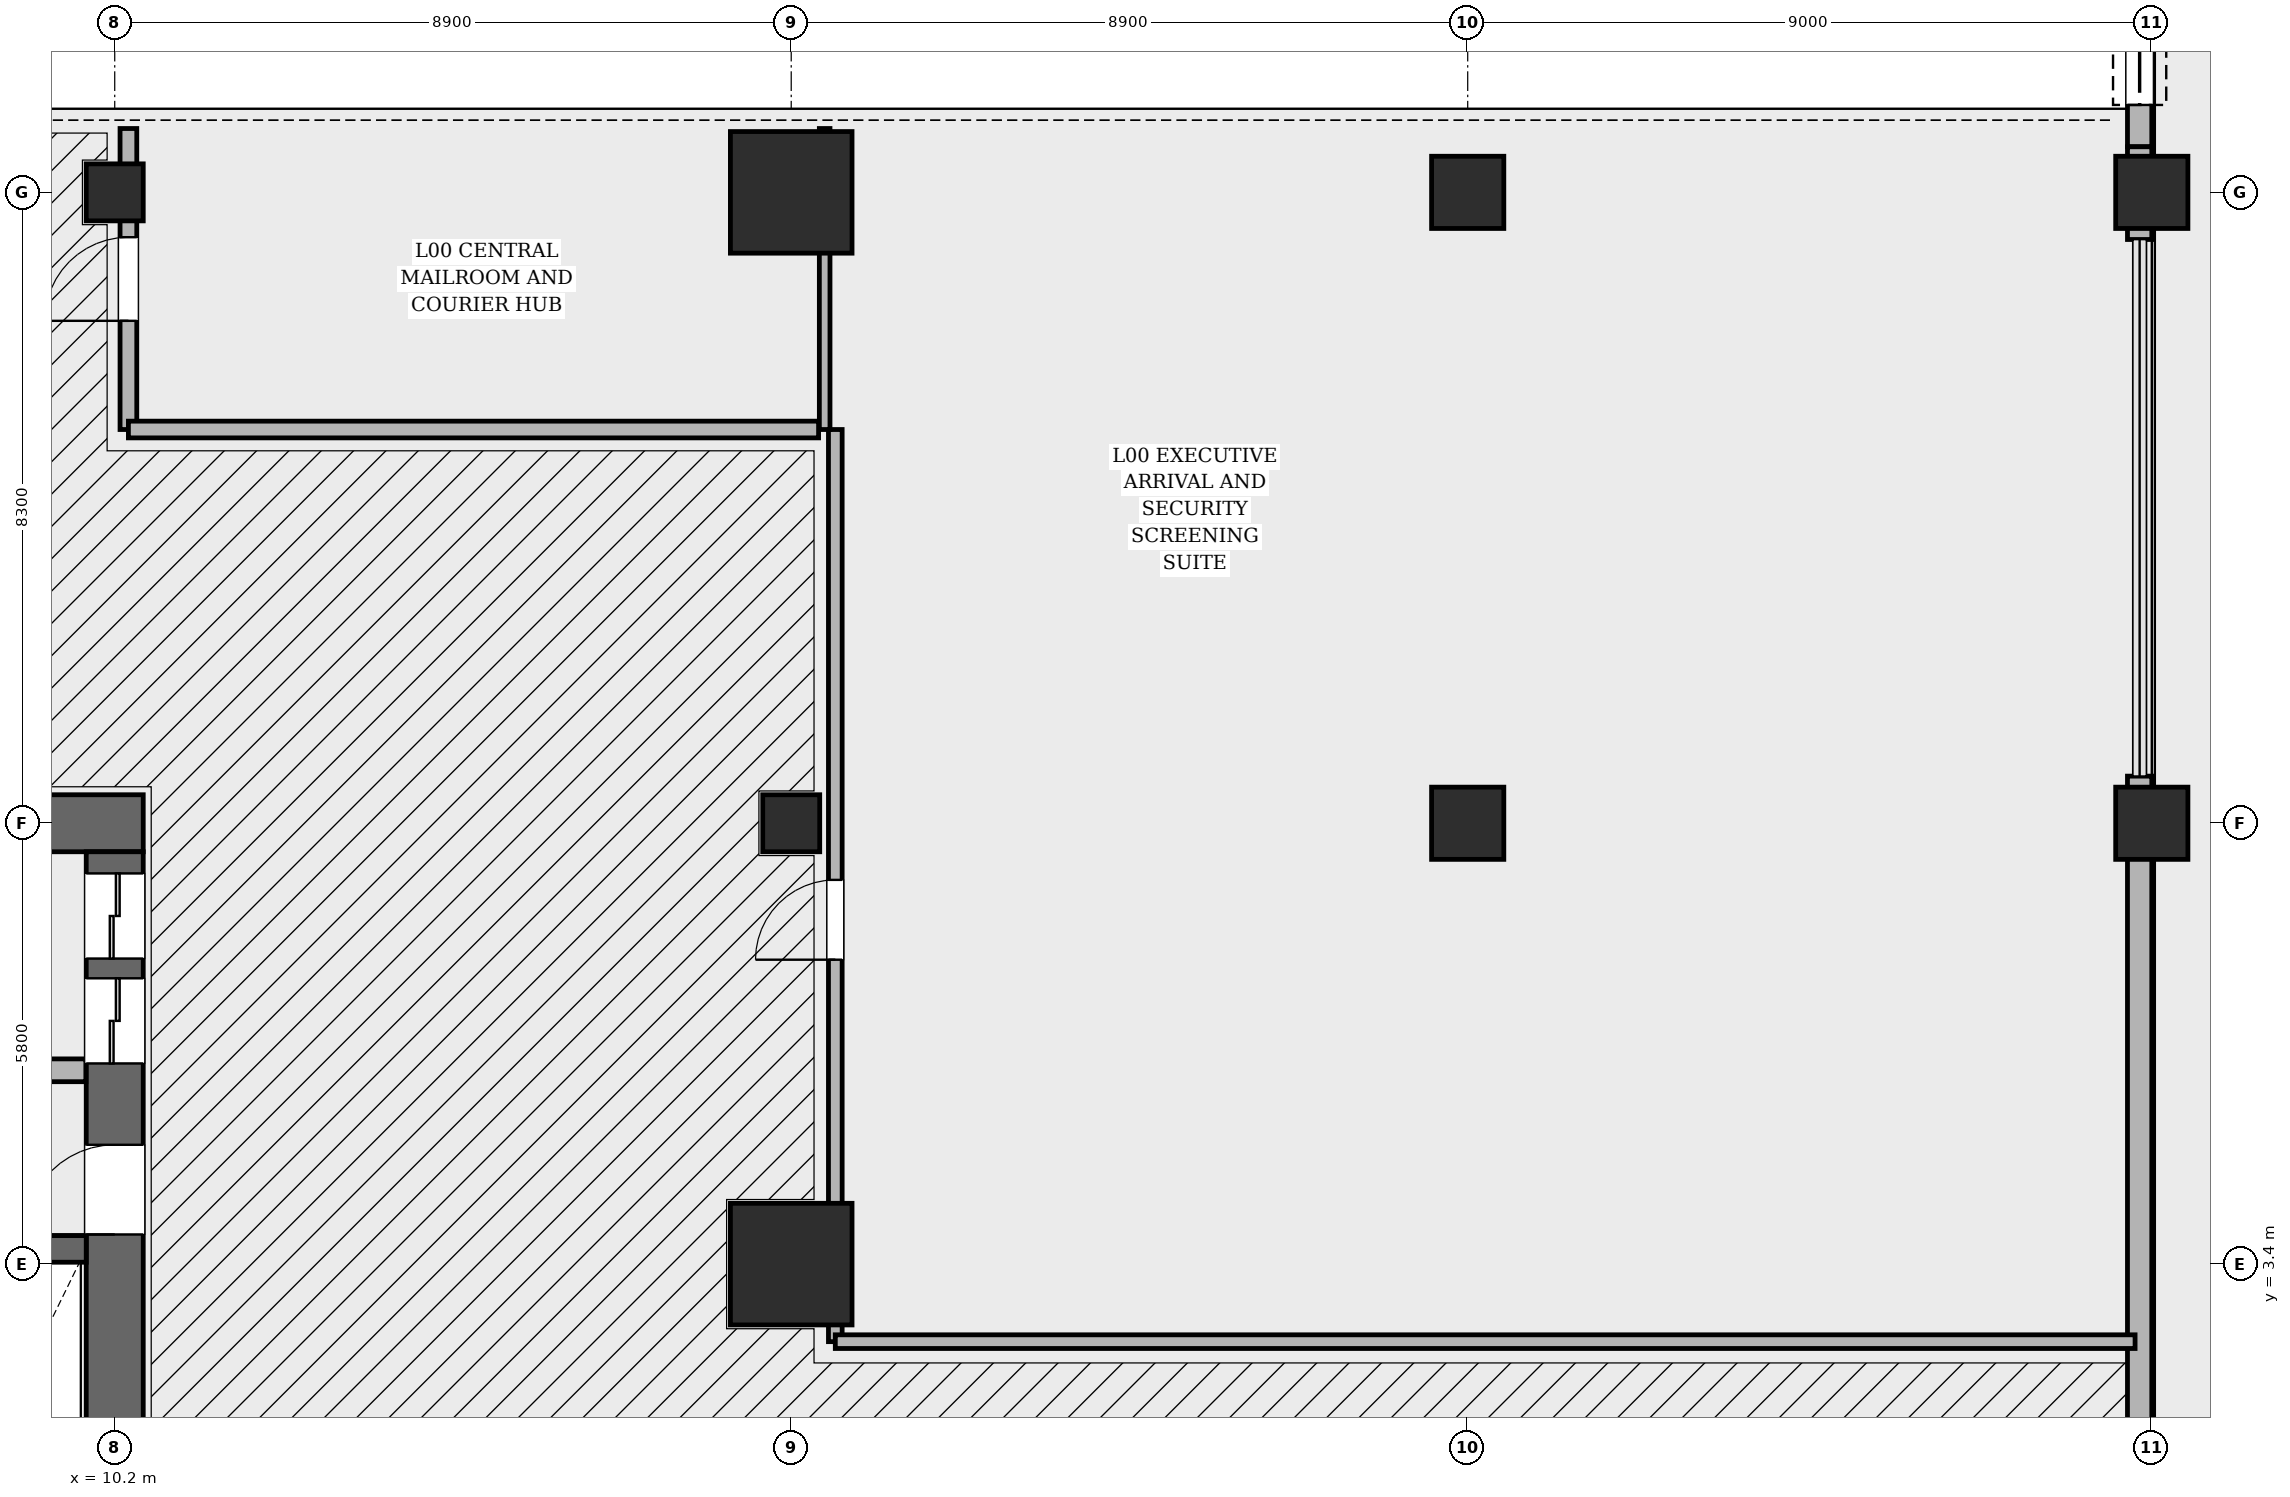
"""IFC4 building model, lengths in metres.
Left out: names, types, materials, properties, quantities, classifications, styles, units other than length and angle.
Written with IfcOpenShell. Run it as: python <this file> out.ifc"""

import sys

from ifc_helpers import new_model, si_unit, direction, frame, frame_2d, origin, origin_2d, place, context, subcontext, project, spatial, rectangle, hollow_rectangle, circle, extrude, element, fill, save


model = new_model("IFC4")
c1 = context("Model", 3, precision=1e-05, world=origin(), true_north=direction((0.0, 1.0)))
c2 = subcontext(c1, "Body", "Model", "MODEL_VIEW")
j1 = project(units=[si_unit("LENGTHUNIT", "METRE"), si_unit("PLANEANGLEUNIT", "RADIAN")], contexts=[c1])
p1 = place(None, origin())
s1 = spatial("IfcSite", under=j1, at=p1, CompositionType="ELEMENT")
p2 = place(p1, origin())
s2 = spatial("IfcBuilding", under=s1, at=p2, CompositionType="ELEMENT")
p3 = place(p2, origin())
s3 = spatial("IfcBuildingStorey", under=s2, at=p3, CompositionType="ELEMENT", Elevation=0.0)
p4 = place(p3, frame((-10.575, 9.2, 0.0), z_axis=(0.0, 0.0, 1.0), x_axis=(1.0, 0.0, 0.0)))
e1 = element("IfcWall", 1, at=p4, inside=s3, PredefinedType="SHEAR", context=c2, shape_type="SweptSolid", body=[
    extrude(rectangle(XDim=21.15, YDim=0.75, at=frame_2d((10.575, 0.0))), origin(), (0.0, 0.0, 1.0), 6.0),
])
p5 = place(p3, frame((10.2, 8.825, 0.0), z_axis=(0.0, 0.0, 1.0), x_axis=(0.0, -1.0, 0.0)))
e2 = element("IfcWall", 2, at=p5, inside=s3, PredefinedType="SHEAR", context=c2, shape_type="SweptSolid", body=[
    extrude(rectangle(XDim=17.65, YDim=0.75, at=frame_2d((8.825, 0.0))), origin(), (0.0, 0.0, 1.0), 6.0),
])
p6 = place(p5, frame((3.855, 0.0, 0.0)))
e3 = element("IfcOpeningElement", 3, at=p6, cuts=e2, PredefinedType="OPENING", context=c2, shape_type="SweptSolid", body=[
    extrude(rectangle(XDim=1.18, YDim=2.2, at=frame_2d((0.59, 1.1))), frame((0.0, 0.385, 0.0), z_axis=(0.0, -1.0, 0.0), x_axis=(1.0, 0.0, 0.0)), (0.0, 0.0, 1.0), 0.77),
])
p7 = place(p5, frame((1.665, 0.0, 0.0)))
e4 = element("IfcOpeningElement", 4, at=p7, cuts=e2, PredefinedType="OPENING", context=c2, shape_type="SweptSolid", body=[
    extrude(rectangle(XDim=1.12, YDim=2.25, at=frame_2d((0.56, 1.125))), frame((0.0, 0.385, 0.0), z_axis=(0.0, -1.0, 0.0), x_axis=(1.0, 0.0, 0.0)), (0.0, 0.0, 1.0), 0.77),
])
p8 = place(p5, frame((0.285, 0.0, 0.0)))
e5 = element("IfcOpeningElement", 5, at=p8, cuts=e2, PredefinedType="OPENING", context=c2, shape_type="SweptSolid", body=[
    extrude(rectangle(XDim=1.12, YDim=2.25, at=frame_2d((0.56, 1.125))), frame((0.0, 0.385, 0.0), z_axis=(0.0, -1.0, 0.0), x_axis=(1.0, 0.0, 0.0)), (0.0, 0.0, 1.0), 0.77),
])
p9 = place(p3, frame((4.65, 3.6, 0.0), z_axis=(0.0, 0.0, 1.0), x_axis=(1.0, 0.0, 0.0)))
e6 = element("IfcWall", 6, at=p9, inside=s3, PredefinedType="SOLIDWALL", context=c2, shape_type="SweptSolid", body=[
    extrude(rectangle(XDim=5.175, YDim=0.35, at=frame_2d((2.587, 0.0))), origin(), (0.0, 0.0, 1.0), 6.0),
])
for number, where, z_axis, x_axis in (
    (7, (19.1, 3.4, 0.0), (0.0, 0.0, 1.0), (1.0, 0.0, 0.0)),
    (8, (19.1, 17.5, 0.0), (0.0, 0.0, 1.0), (1.0, 0.0, 0.0)),
):
    element("IfcColumn", number, at=place(p3, frame(where, z_axis=z_axis, x_axis=x_axis)), inside=s3, PredefinedType="COLUMN", context=c2, shape_type="SweptSolid", body=[
        extrude(hollow_rectangle(XDim=1.6, YDim=1.6, WallThickness=0.05, at=origin_2d()), origin(), (0.0, 0.0, 1.0), 6.0),
    ])
for number, where, z_axis, x_axis in (
    (9, (37.0, 9.2, 0.0), (0.0, 0.0, 1.0), (1.0, 0.0, 0.0)),
    (10, (28.0, 17.5, 0.0), (0.0, 0.0, 1.0), (1.0, 0.0, 0.0)),
    (11, (37.0, 17.5, 0.0), (0.0, 0.0, 1.0), (1.0, 0.0, 0.0)),
    (12, (28.0, 9.2, 0.0), (0.0, 0.0, 1.0), (1.0, 0.0, 0.0)),
):
    element("IfcColumn", number, at=place(p3, frame(where, z_axis=z_axis, x_axis=x_axis)), inside=s3, PredefinedType="COLUMN", context=c2, shape_type="SweptSolid", body=[
        extrude(rectangle(XDim=0.95, YDim=0.95, at=origin_2d()), origin(), (0.0, 0.0, 1.0), 6.0),
    ])
for number, where, z_axis, x_axis in (
    (13, (10.2, 17.5, 0.0), (0.0, 0.0, 1.0), (1.0, 0.0, 0.0)),
    (14, (19.1, 9.2, 0.0), (0.0, 0.0, 1.0), (1.0, 0.0, 0.0)),
):
    element("IfcColumn", number, at=place(p3, frame(where, z_axis=z_axis, x_axis=x_axis)), inside=s3, PredefinedType="PILASTER", context=c2, shape_type="SweptSolid", body=[
        extrude(circle(Radius=0.375, at=origin_2d()), origin(), (0.0, 0.0, 1.0), 6.0),
    ])
p10 = place(p3, frame((36.84, 24.4, 0.0), z_axis=(0.0, 0.0, 1.0), x_axis=(0.0, -1.0, 0.0)))
e15 = element("IfcWall", 15, at=p10, inside=s3, PredefinedType="SOLIDWALL", context=c2, shape_type="SweptSolid", body=[
    extrude(rectangle(XDim=6.3, YDim=0.32, at=frame_2d((3.15, 0.0))), origin(), (0.0, 0.0, 1.0), 5.164),
])
p11 = place(p10, frame((0.55, 0.0, 0.0)))
e16 = element("IfcOpeningElement", 16, at=p11, cuts=e15, PredefinedType="OPENING", context=c2, shape_type="SweptSolid", body=[
    extrude(rectangle(XDim=5.2, YDim=3.2, at=frame_2d((2.6, 1.6))), frame((0.0, 0.17, 0.0), z_axis=(0.0, -1.0, 0.0), x_axis=(1.0, 0.0, 0.0)), (0.0, 0.0, 1.0), 0.34),
])
p12 = place(p3, frame((36.84, 18.1, 0.0), z_axis=(0.0, 0.0, 1.0), x_axis=(0.0, -1.0, 0.0)))
e17 = element("IfcWall", 17, at=p12, inside=s3, PredefinedType="SOLIDWALL", context=c2, shape_type="SweptSolid", body=[
    extrude(rectangle(XDim=1.22, YDim=0.32, at=frame_2d((0.61, 0.0))), origin(), (0.0, 0.0, 1.0), 5.014),
])
p13 = place(p3, frame((36.84, 9.82, 0.0), z_axis=(0.0, 0.0, 1.0), x_axis=(0.0, -1.0, 0.0)))
e18 = element("IfcWall", 18, at=p13, inside=s3, PredefinedType="SOLIDWALL", context=c2, shape_type="SweptSolid", body=[
    extrude(rectangle(XDim=19.64, YDim=0.32, at=frame_2d((9.82, 0.0))), origin(), (0.0, 0.0, 1.0), 5.014),
])
p14 = place(p3, frame((5.06, 5.95, 0.0), z_axis=(0.0, 0.0, 1.0), x_axis=(1.0, 0.0, 0.0)))
e19 = element("IfcWall", 19, at=p14, inside=s3, PredefinedType="SOLIDWALL", context=c2, shape_type="SweptSolid", body=[
    extrude(rectangle(XDim=4.76, YDim=0.3, at=frame_2d((2.38, 0.0))), origin(), (0.0, 0.0, 1.0), 5.72),
])
p15 = place(p3, frame((19.68, 2.38, 0.0), z_axis=(0.0, 0.0, 1.0), x_axis=(0.0, 1.0, 0.0)))
e20 = element("IfcWall", 20, at=p15, inside=s3, PredefinedType="PARTITIONING", context=c2, shape_type="SweptSolid", body=[
    extrude(rectangle(XDim=12.0, YDim=0.18, at=frame_2d((6.0, 0.0))), origin(), (0.0, 0.0, 1.0), 5.014),
])
p16 = place(p15, frame((5.025, 0.0, 0.0)))
e21 = element("IfcOpeningElement", 21, at=p16, cuts=e20, PredefinedType="OPENING", context=c2, shape_type="SweptSolid", body=[
    extrude(rectangle(XDim=1.05, YDim=2.2, at=frame_2d((0.525, 1.1))), frame((0.0, 0.1, 0.0), z_axis=(0.0, -1.0, 0.0), x_axis=(1.0, 0.0, 0.0)), (0.0, 0.0, 1.0), 0.2),
])
p17 = place(p3, frame((19.54, 14.38, 0.0), z_axis=(0.0, 0.0, 1.0), x_axis=(0.0, 1.0, 0.0)))
e22 = element("IfcWall", 22, at=p17, inside=s3, PredefinedType="PARTITIONING", context=c2, shape_type="SweptSolid", body=[
    extrude(rectangle(XDim=3.96, YDim=0.14, at=frame_2d((1.98, 0.0))), origin(), (0.0, 0.0, 1.0), 5.014),
])
p18 = place(p3, frame((36.78, 2.38, 0.0), z_axis=(0.0, 0.0, 1.0), x_axis=(-1.0, 0.0, 0.0)))
e23 = element("IfcWall", 23, at=p18, inside=s3, PredefinedType="PARTITIONING", context=c2, shape_type="SweptSolid", body=[
    extrude(rectangle(XDim=17.1, YDim=0.18, at=frame_2d((8.55, 0.0))), origin(), (0.0, 0.0, 1.0), 5.014),
])
p19 = place(p3, frame((10.38, 14.38, 0.0), z_axis=(0.0, 0.0, 1.0), x_axis=(0.0, 1.0, 0.0)))
e24 = element("IfcWall", 24, at=p19, inside=s3, PredefinedType="SOLIDWALL", context=c2, shape_type="SweptSolid", body=[
    extrude(rectangle(XDim=3.96, YDim=0.22, at=frame_2d((1.98, 0.0))), origin(), (0.0, 0.0, 1.0), 5.014),
])
p20 = place(p19, frame((1.43, 0.0, 0.0)))
e25 = element("IfcOpeningElement", 25, at=p20, cuts=e24, PredefinedType="OPENING", context=c2, shape_type="SweptSolid", body=[
    extrude(rectangle(XDim=1.1, YDim=2.2, at=frame_2d((0.55, 1.1))), frame((0.0, 0.12, 0.0), z_axis=(0.0, -1.0, 0.0), x_axis=(1.0, 0.0, 0.0)), (0.0, 0.0, 1.0), 0.24),
])
p21 = place(p3, frame((19.46, 14.38, 0.0), z_axis=(0.0, 0.0, 1.0), x_axis=(-1.0, 0.0, 0.0)))
e26 = element("IfcWall", 26, at=p21, inside=s3, PredefinedType="SOLIDWALL", context=c2, shape_type="SweptSolid", body=[
    extrude(rectangle(XDim=9.08, YDim=0.22, at=frame_2d((4.54, 0.0))), origin(), (0.0, 0.0, 1.0), 5.014),
])
p22 = place(p11, origin())
e27 = element("IfcDoor", 27, at=p22, inside=s3, OperationType="ROLLINGUP", PredefinedType="GATE", context=c2, shape_type="SweptSolid", body=[
    extrude(rectangle(XDim=5.2, YDim=3.2, at=frame_2d((2.6, 1.6))), frame((0.0, 0.025, 0.0), z_axis=(0.0, -1.0, 0.0), x_axis=(1.0, 0.0, 0.0)), (0.0, 0.0, 1.0), 0.05),
])
fill(e16, e27)
p23 = place(p6, origin())
e28 = element("IfcDoor", 28, at=p23, inside=s3, OperationType="SINGLE_SWING_RIGHT", PredefinedType="DOOR", context=c2, shape_type="SweptSolid", body=[
    extrude(rectangle(XDim=1.18, YDim=2.2, at=frame_2d((0.59, 1.1))), frame((0.0, 0.025, 0.0), z_axis=(0.0, -1.0, 0.0), x_axis=(1.0, 0.0, 0.0)), (0.0, 0.0, 1.0), 0.05),
])
fill(e3, e28)
p24 = place(p7, origin())
e29 = element("IfcDoor", 29, at=p24, inside=s3, OperationType="DOUBLE_DOOR_SLIDING", PredefinedType="DOOR", context=c2, shape_type="SweptSolid", body=[
    extrude(rectangle(XDim=1.12, YDim=2.25, at=frame_2d((0.56, 1.125))), frame((0.0, 0.025, 0.0), z_axis=(0.0, -1.0, 0.0), x_axis=(1.0, 0.0, 0.0)), (0.0, 0.0, 1.0), 0.05),
])
fill(e4, e29)
p25 = place(p8, origin())
e30 = element("IfcDoor", 30, at=p25, inside=s3, OperationType="DOUBLE_DOOR_SLIDING", PredefinedType="DOOR", context=c2, shape_type="SweptSolid", body=[
    extrude(rectangle(XDim=1.12, YDim=2.25, at=frame_2d((0.56, 1.125))), frame((0.0, 0.025, 0.0), z_axis=(0.0, -1.0, 0.0), x_axis=(1.0, 0.0, 0.0)), (0.0, 0.0, 1.0), 0.05),
])
fill(e5, e30)
p26 = place(p16, origin())
e31 = element("IfcDoor", 31, at=p26, inside=s3, OperationType="SINGLE_SWING_LEFT", PredefinedType="DOOR", context=c2, shape_type="SweptSolid", body=[
    extrude(rectangle(XDim=1.05, YDim=2.2, at=frame_2d((0.525, 1.1))), frame((0.0, 0.025, 0.0), z_axis=(0.0, -1.0, 0.0), x_axis=(1.0, 0.0, 0.0)), (0.0, 0.0, 1.0), 0.05),
])
fill(e21, e31)
p27 = place(p20, origin())
e32 = element("IfcDoor", 32, at=p27, inside=s3, OperationType="SINGLE_SWING_LEFT", PredefinedType="DOOR", context=c2, shape_type="SweptSolid", body=[
    extrude(rectangle(XDim=1.1, YDim=2.2, at=frame_2d((0.55, 1.1))), frame((0.0, 0.025, 0.0), z_axis=(0.0, -1.0, 0.0), x_axis=(1.0, 0.0, 0.0)), (0.0, 0.0, 1.0), 0.05),
])
fill(e25, e32)
save(model, sys.argv[1])
